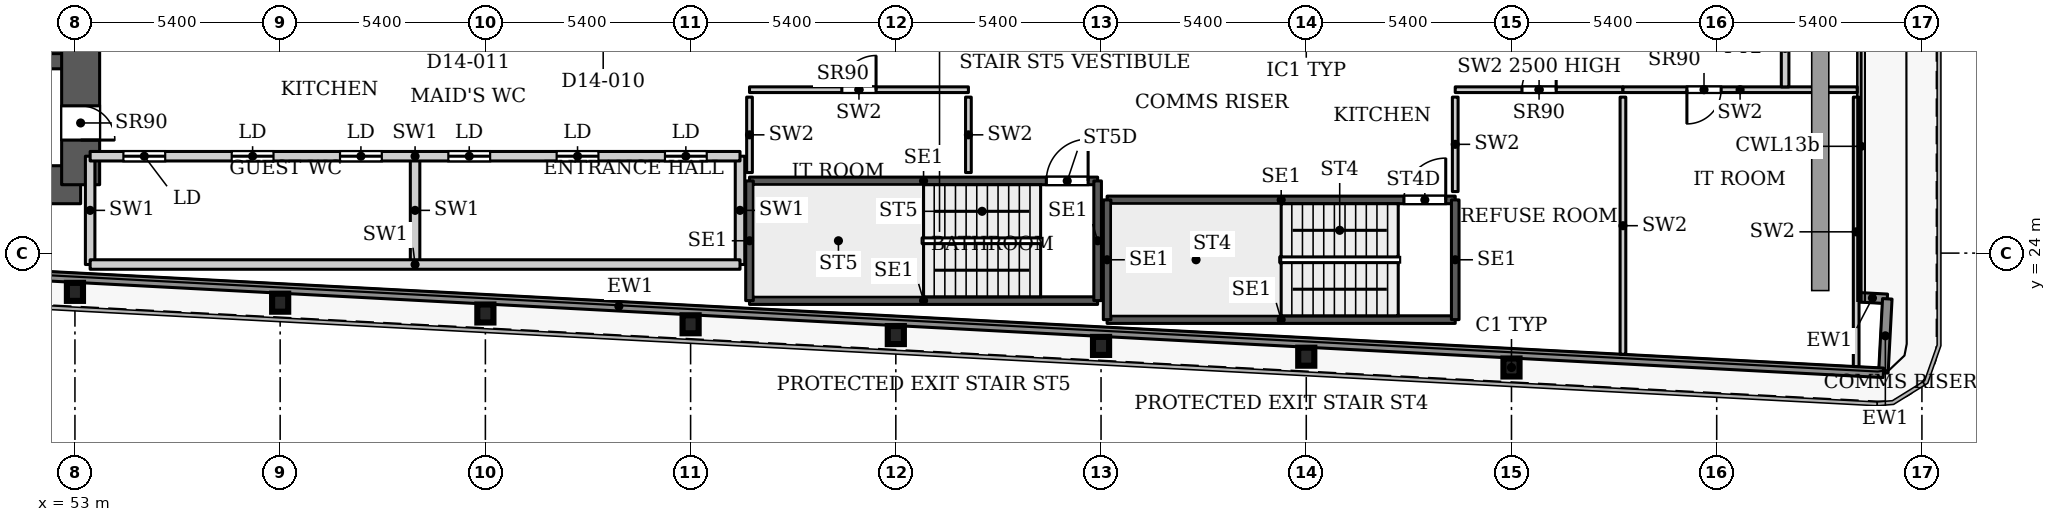
"""IFC4 building model, lengths in metres.
Left out: names, types, materials, properties, quantities, classifications, styles, units other than length and angle.
Written with IfcOpenShell. Run it as: python <this file> out.ifc"""

import sys

from ifc_helpers import new_model, si_unit, direction, frame, frame_2d, origin, origin_2d, place, context, subcontext, project, spatial, rectangle, i_section, extrude, source, transform, mapped, element, fill, save


model = new_model("IFC4")
c1 = context("Model", 3, precision=1e-05, world=origin(), true_north=direction((0.0, 1.0)))
c2 = subcontext(c1, "Body", "Model", "MODEL_VIEW")
j1 = project(units=[si_unit("LENGTHUNIT", "METRE"), si_unit("PLANEANGLEUNIT", "RADIAN")], contexts=[c1])
p1 = place(None, origin())
s1 = spatial("IfcSite", under=j1, at=p1, CompositionType="ELEMENT")
p2 = place(p1, origin())
s2 = spatial("IfcBuilding", under=s1, at=p2, CompositionType="ELEMENT")
p3 = place(p2, frame((0.0, 0.0, 65.6)))
s3 = spatial("IfcBuildingStorey", under=s2, at=p3, CompositionType="ELEMENT", Elevation=65.6)
for number, where, z_axis, x_axis in (
    (1, (90.8, 20.99, 0.0), (0.0, 0.0, 1.0), (1.0, 0.0, 0.0)),
    (2, (85.4, 21.274, 0.0), (0.0, 0.0, 1.0), (1.0, 0.0, 0.0)),
    (3, (80.0, 21.558, 0.0), (0.0, 0.0, 1.0), (1.0, 0.0, 0.0)),
    (4, (74.6, 21.843, 0.0), (0.0, 0.0, 1.0), (1.0, 0.0, 0.0)),
    (5, (69.2, 22.127, 0.0), (0.0, 0.0, 1.0), (1.0, 0.0, 0.0)),
    (6, (63.8, 22.411, 0.0), (0.0, 0.0, 1.0), (1.0, 0.0, 0.0)),
    (7, (58.4, 22.695, 0.0), (0.0, 0.0, 1.0), (1.0, 0.0, 0.0)),
    (8, (53.0, 22.98, 0.0), (0.0, 0.0, 1.0), (1.0, 0.0, 0.0)),
):
    element("IfcColumn", number, at=place(p3, frame(where, z_axis=z_axis, x_axis=x_axis)), inside=s3, PredefinedType="COLUMN", context=c2, shape_type="SweptSolid", body=[
        extrude(i_section(OverallWidth=0.424, OverallDepth=0.474, WebThickness=0.048, FlangeThickness=0.077, FilletRadius=0.014, at=origin_2d()), origin(), (0.0, 0.0, 1.0), 3.9),
    ])
p4 = place(p3, frame((34.75, 25.8, 0.0), z_axis=(0.0, 0.0, 1.0), x_axis=(1.0, 0.0, 0.0)))
e9 = element("IfcWall", 9, at=p4, inside=s3, PredefinedType="SHEAR", context=c2, shape_type="SweptSolid", body=[
    extrude(rectangle(XDim=18.4, YDim=1.0, at=frame_2d((9.2, 0.0))), origin(), (0.0, 0.0, 1.0), 3.9),
])
p5 = place(p3, frame((34.75, 29.05, 0.0), z_axis=(0.0, 0.0, 1.0), x_axis=(1.0, 0.0, 0.0)))
e10 = element("IfcWall", 10, at=p5, inside=s3, PredefinedType="SHEAR", context=c2, shape_type="SweptSolid", body=[
    extrude(rectangle(XDim=18.4, YDim=0.4, at=frame_2d((9.2, 0.0))), origin(), (0.0, 0.0, 1.0), 3.9),
])
p6 = place(p5, frame((15.125, 0.0, 0.0)))
e11 = element("IfcOpeningElement", 11, at=p6, cuts=e10, PredefinedType="OPENING", context=c2, shape_type="SweptSolid", body=[
    extrude(rectangle(XDim=1.1, YDim=2.2, at=frame_2d((0.55, 1.1))), frame((0.0, 0.21, 0.0), z_axis=(0.0, -1.0, 0.0), x_axis=(1.0, 0.0, 0.0)), (0.0, 0.0, 1.0), 0.42),
])
p7 = place(p3, frame((53.15, 25.8, 0.0), z_axis=(0.0, 0.0, 1.0), x_axis=(0.0, 1.0, 0.0)))
e12 = element("IfcWall", 12, at=p7, inside=s3, PredefinedType="SHEAR", context=c2, shape_type="SweptSolid", body=[
    extrude(rectangle(XDim=10.4, YDim=1.0, at=frame_2d((5.2, 0.0))), origin(), (0.0, 0.0, 1.0), 3.9),
])
p8 = place(p7, frame((1.175, 0.0, 0.0)))
e13 = element("IfcOpeningElement", 13, at=p8, cuts=e12, PredefinedType="OPENING", context=c2, shape_type="SweptSolid", body=[
    extrude(rectangle(XDim=0.9, YDim=2.2, at=frame_2d((0.45, 1.1))), frame((0.0, 0.51, 0.0), z_axis=(0.0, -1.0, 0.0), x_axis=(1.0, 0.0, 0.0)), (0.0, 0.0, 1.0), 1.02),
])
p9 = place(p3, frame((99.907, 22.839, 0.0), z_axis=(0.0, 0.0, 1.0), x_axis=(0.998561284263, -0.053622398031, 0.0)))
e14 = element("IfcWall", 14, at=p9, inside=s3, PredefinedType="SOLIDWALL", context=c2, shape_type="SweptSolid", body=[
    extrude(rectangle(XDim=0.783, YDim=0.25, at=frame_2d((0.392, 0.0))), origin(), (0.0, 0.0, 1.0), 3.75),
])
p10 = place(p3, frame((100.689, 22.797, 0.0), z_axis=(0.0, 0.0, 1.0), x_axis=(-0.052841433274, -0.998602915542, 0.0)))
e15 = element("IfcWall", 15, at=p10, inside=s3, PredefinedType="SOLIDWALL", context=c2, shape_type="SweptSolid", body=[
    extrude(rectangle(XDim=1.95, YDim=0.25, at=frame_2d((0.975, 0.0))), origin(), (0.0, 0.0, 1.0), 3.75),
])
p11 = place(p3, frame((100.586, 20.85, 0.0), z_axis=(0.0, 0.0, 1.0), x_axis=(-0.99861746497, 0.052565755559, 0.0)))
e16 = element("IfcWall", 16, at=p11, inside=s3, PredefinedType="SOLIDWALL", context=c2, shape_type="SweptSolid", body=[
    extrude(rectangle(XDim=66.639, YDim=0.25, at=frame_2d((33.319, 0.0))), origin(), (0.0, 0.0, 1.0), 3.75),
])
p12 = place(p3, frame((80.16, 22.25, 0.0), z_axis=(0.0, 0.0, 1.0), x_axis=(1.0, 0.0, 0.0)))
e17 = element("IfcWall", 17, at=p12, inside=s3, PredefinedType="SHEAR", context=c2, shape_type="SweptSolid", body=[
    extrude(rectangle(XDim=9.16, YDim=0.2, at=frame_2d((4.58, 0.0))), origin(), (0.0, 0.0, 1.0), 3.9),
])
p13 = place(p3, frame((80.16, 25.4, 0.0), z_axis=(0.0, 0.0, 1.0), x_axis=(1.0, 0.0, 0.0)))
e18 = element("IfcWall", 18, at=p13, inside=s3, PredefinedType="SHEAR", context=c2, shape_type="SweptSolid", body=[
    extrude(rectangle(XDim=9.16, YDim=0.2, at=frame_2d((4.58, 0.0))), origin(), (0.0, 0.0, 1.0), 3.9),
])
p14 = place(p13, frame((7.81, 0.0, 0.0)))
e19 = element("IfcOpeningElement", 19, at=p14, cuts=e18, PredefinedType="OPENING", context=c2, shape_type="SweptSolid", body=[
    extrude(rectangle(XDim=1.1, YDim=2.2, at=frame_2d((0.55, 1.1))), frame((0.0, 0.11, 0.0), z_axis=(0.0, -1.0, 0.0), x_axis=(1.0, 0.0, 0.0)), (0.0, 0.0, 1.0), 0.22),
])
for number, where, z_axis, x_axis in (
    (20, (80.16, 22.25, 0.0), (0.0, 0.0, 1.0), (0.0, 1.0, 0.0)),
    (21, (89.32, 22.25, 0.0), (0.0, 0.0, 1.0), (0.0, 1.0, 0.0)),
):
    element("IfcWall", number, at=place(p3, frame(where, z_axis=z_axis, x_axis=x_axis)), inside=s3, PredefinedType="SHEAR", context=c2, shape_type="SweptSolid", body=[
        extrude(rectangle(XDim=3.15, YDim=0.2, at=frame_2d((1.575, 0.0))), origin(), (0.0, 0.0, 1.0), 3.9),
    ])
p15 = place(p3, frame((70.75, 22.75, 0.0), z_axis=(0.0, 0.0, 1.0), x_axis=(1.0, 0.0, 0.0)))
e22 = element("IfcWall", 22, at=p15, inside=s3, PredefinedType="SHEAR", context=c2, shape_type="SweptSolid", body=[
    extrude(rectangle(XDim=9.16, YDim=0.2, at=frame_2d((4.58, 0.0))), origin(), (0.0, 0.0, 1.0), 3.9),
])
p16 = place(p3, frame((70.75, 25.9, 0.0), z_axis=(0.0, 0.0, 1.0), x_axis=(1.0, 0.0, 0.0)))
e23 = element("IfcWall", 23, at=p16, inside=s3, PredefinedType="SHEAR", context=c2, shape_type="SweptSolid", body=[
    extrude(rectangle(XDim=9.16, YDim=0.2, at=frame_2d((4.58, 0.0))), origin(), (0.0, 0.0, 1.0), 3.9),
])
p17 = place(p16, frame((7.81, 0.0, 0.0)))
e24 = element("IfcOpeningElement", 24, at=p17, cuts=e23, PredefinedType="OPENING", context=c2, shape_type="SweptSolid", body=[
    extrude(rectangle(XDim=1.1, YDim=2.2, at=frame_2d((0.55, 1.1))), frame((0.0, 0.11, 0.0), z_axis=(0.0, -1.0, 0.0), x_axis=(1.0, 0.0, 0.0)), (0.0, 0.0, 1.0), 0.22),
])
for number, where, z_axis, x_axis in (
    (25, (70.75, 22.75, 0.0), (0.0, 0.0, 1.0), (0.0, 1.0, 0.0)),
    (26, (79.91, 22.75, 0.0), (0.0, 0.0, 1.0), (0.0, 1.0, 0.0)),
):
    element("IfcWall", number, at=place(p3, frame(where, z_axis=z_axis, x_axis=x_axis)), inside=s3, PredefinedType="SHEAR", context=c2, shape_type="SweptSolid", body=[
        extrude(rectangle(XDim=3.15, YDim=0.2, at=frame_2d((1.575, 0.0))), origin(), (0.0, 0.0, 1.0), 3.9),
    ])
for number, where, z_axis, x_axis in (
    (27, (53.4, 23.7, 0.0), (0.0, 0.0, 1.0), (0.0, 1.0, 0.0)),
    (28, (61.95, 23.7, 0.0), (0.0, 0.0, 1.0), (0.0, 1.0, 0.0)),
    (29, (70.5, 23.7, 0.0), (0.0, 0.0, 1.0), (0.0, 1.0, 0.0)),
):
    element("IfcWall", number, at=place(p3, frame(where, z_axis=z_axis, x_axis=x_axis)), inside=s3, PredefinedType="PARTITIONING", context=c2, shape_type="SweptSolid", body=[
        extrude(rectangle(XDim=2.85, YDim=0.25, at=frame_2d((1.425, 0.0))), origin(), (0.0, 0.0, 1.0), 3.9),
    ])
p18 = place(p3, frame((53.4, 23.7, 0.0), z_axis=(0.0, 0.0, 1.0), x_axis=(1.0, 0.0, 0.0)))
e30 = element("IfcWall", 30, at=p18, inside=s3, PredefinedType="PARTITIONING", context=c2, shape_type="SweptSolid", body=[
    extrude(rectangle(XDim=17.1, YDim=0.25, at=frame_2d((8.55, 0.0))), origin(), (0.0, 0.0, 1.0), 3.9),
])
p19 = place(p3, frame((53.4, 26.55, 0.0), z_axis=(0.0, 0.0, 1.0), x_axis=(1.0, 0.0, 0.0)))
e31 = element("IfcWall", 31, at=p19, inside=s3, PredefinedType="PARTITIONING", context=c2, shape_type="SweptSolid", body=[
    extrude(rectangle(XDim=17.1, YDim=0.25, at=frame_2d((8.55, 0.0))), origin(), (0.0, 0.0, 1.0), 3.9),
])
p20 = place(p19, frame((0.875, 0.0, 0.0)))
e32 = element("IfcOpeningElement", 32, at=p20, cuts=e31, PredefinedType="OPENING", context=c2, shape_type="SweptSolid", body=[
    extrude(rectangle(XDim=1.1, YDim=2.2, at=frame_2d((0.55, 1.1))), frame((0.0, 0.135, 0.0), z_axis=(0.0, -1.0, 0.0), x_axis=(1.0, 0.0, 0.0)), (0.0, 0.0, 1.0), 0.27),
])
p21 = place(p19, frame((3.725, 0.0, 0.0)))
e33 = element("IfcOpeningElement", 33, at=p21, cuts=e31, PredefinedType="OPENING", context=c2, shape_type="SweptSolid", body=[
    extrude(rectangle(XDim=1.1, YDim=2.2, at=frame_2d((0.55, 1.1))), frame((0.0, 0.135, 0.0), z_axis=(0.0, -1.0, 0.0), x_axis=(1.0, 0.0, 0.0)), (0.0, 0.0, 1.0), 0.27),
])
p22 = place(p19, frame((6.575, 0.0, 0.0)))
e34 = element("IfcOpeningElement", 34, at=p22, cuts=e31, PredefinedType="OPENING", context=c2, shape_type="SweptSolid", body=[
    extrude(rectangle(XDim=1.1, YDim=2.2, at=frame_2d((0.55, 1.1))), frame((0.0, 0.135, 0.0), z_axis=(0.0, -1.0, 0.0), x_axis=(1.0, 0.0, 0.0)), (0.0, 0.0, 1.0), 0.27),
])
p23 = place(p19, frame((9.425, 0.0, 0.0)))
e35 = element("IfcOpeningElement", 35, at=p23, cuts=e31, PredefinedType="OPENING", context=c2, shape_type="SweptSolid", body=[
    extrude(rectangle(XDim=1.1, YDim=2.2, at=frame_2d((0.55, 1.1))), frame((0.0, 0.135, 0.0), z_axis=(0.0, -1.0, 0.0), x_axis=(1.0, 0.0, 0.0)), (0.0, 0.0, 1.0), 0.27),
])
p24 = place(p19, frame((12.275, 0.0, 0.0)))
e36 = element("IfcOpeningElement", 36, at=p24, cuts=e31, PredefinedType="OPENING", context=c2, shape_type="SweptSolid", body=[
    extrude(rectangle(XDim=1.1, YDim=2.2, at=frame_2d((0.55, 1.1))), frame((0.0, 0.135, 0.0), z_axis=(0.0, -1.0, 0.0), x_axis=(1.0, 0.0, 0.0)), (0.0, 0.0, 1.0), 0.27),
])
p25 = place(p19, frame((15.125, 0.0, 0.0)))
e37 = element("IfcOpeningElement", 37, at=p25, cuts=e31, PredefinedType="OPENING", context=c2, shape_type="SweptSolid", body=[
    extrude(rectangle(XDim=1.1, YDim=2.2, at=frame_2d((0.55, 1.1))), frame((0.0, 0.135, 0.0), z_axis=(0.0, -1.0, 0.0), x_axis=(1.0, 0.0, 0.0)), (0.0, 0.0, 1.0), 0.27),
])
p26 = place(p3, frame((70.75, 28.3, 0.0), z_axis=(0.0, 0.0, 1.0), x_axis=(1.0, 0.0, 0.0)))
e38 = element("IfcWall", 38, at=p26, inside=s3, PredefinedType="PARTITIONING", context=c2, shape_type="SweptSolid", body=[
    extrude(rectangle(XDim=5.76, YDim=0.15, at=frame_2d((2.88, 0.0))), origin(), (0.0, 0.0, 1.0), 3.9),
])
p27 = place(p26, frame((2.43, 0.0, 0.0)))
e39 = element("IfcOpeningElement", 39, at=p27, cuts=e38, PredefinedType="OPENING", context=c2, shape_type="SweptSolid", body=[
    extrude(rectangle(XDim=0.9, YDim=2.2, at=frame_2d((0.45, 1.1))), frame((0.0, 0.085, 0.0), z_axis=(0.0, -1.0, 0.0), x_axis=(1.0, 0.0, 0.0)), (0.0, 0.0, 1.0), 0.17),
])
for number, where, z_axis, x_axis in (
    (40, (70.75, 26.12, 0.0), (0.0, 0.0, 1.0), (0.0, 1.0, 0.0)),
    (41, (76.51, 26.12, 0.0), (0.0, 0.0, 1.0), (0.0, 1.0, 0.0)),
):
    element("IfcWall", number, at=place(p3, frame(where, z_axis=z_axis, x_axis=x_axis)), inside=s3, PredefinedType="PARTITIONING", context=c2, shape_type="SweptSolid", body=[
        extrude(rectangle(XDim=1.985, YDim=0.15, at=frame_2d((0.992, 0.0))), origin(), (0.0, 0.0, 1.0), 3.9),
    ])
p28 = place(p3, frame((89.32, 28.3, 0.0), z_axis=(0.0, 0.0, 1.0), x_axis=(1.0, 0.0, 0.0)))
e42 = element("IfcWall", 42, at=p28, inside=s3, PredefinedType="PARTITIONING", context=c2, shape_type="SweptSolid", body=[
    extrude(rectangle(XDim=4.413, YDim=0.15, at=frame_2d((2.207, 0.0))), origin(), (0.0, 0.0, 1.0), 2.5),
])
p29 = place(p28, frame((1.756, 0.0, 0.0)))
e43 = element("IfcOpeningElement", 43, at=p29, cuts=e42, PredefinedType="OPENING", context=c2, shape_type="SweptSolid", body=[
    extrude(rectangle(XDim=0.9, YDim=2.2, at=frame_2d((0.45, 1.1))), frame((0.0, 0.085, 0.0), z_axis=(0.0, -1.0, 0.0), x_axis=(1.0, 0.0, 0.0)), (0.0, 0.0, 1.0), 0.17),
])
p30 = place(p3, frame((89.32, 25.62, 0.0), z_axis=(0.0, 0.0, 1.0), x_axis=(0.0, 1.0, 0.0)))
e44 = element("IfcWall", 44, at=p30, inside=s3, PredefinedType="PARTITIONING", context=c2, shape_type="SweptSolid", body=[
    extrude(rectangle(XDim=2.485, YDim=0.15, at=frame_2d((1.242, 0.0))), origin(), (0.0, 0.0, 1.0), 3.9),
])
p31 = place(p3, frame((93.733, 21.338, 0.0), z_axis=(0.0, 0.0, 1.0), x_axis=(0.0, 1.0, 0.0)))
e45 = element("IfcWall", 45, at=p31, inside=s3, PredefinedType="PARTITIONING", context=c2, shape_type="SweptSolid", body=[
    extrude(rectangle(XDim=6.767, YDim=0.15, at=frame_2d((3.384, 0.0))), origin(), (0.0, 0.0, 1.0), 3.9),
])
p32 = place(p3, frame((93.733, 28.3, 0.0), z_axis=(0.0, 0.0, 1.0), x_axis=(1.0, 0.0, 0.0)))
e46 = element("IfcWall", 46, at=p32, inside=s3, PredefinedType="PARTITIONING", context=c2, shape_type="SweptSolid", body=[
    extrude(rectangle(XDim=6.165, YDim=0.15, at=frame_2d((3.083, 0.0))), origin(), (0.0, 0.0, 1.0), 3.9),
])
p33 = place(p32, frame((1.683, 0.0, 0.0)))
e47 = element("IfcOpeningElement", 47, at=p33, cuts=e46, PredefinedType="OPENING", context=c2, shape_type="SweptSolid", body=[
    extrude(rectangle(XDim=0.9, YDim=2.2, at=frame_2d((0.45, 1.1))), frame((0.0, 0.085, 0.0), z_axis=(0.0, -1.0, 0.0), x_axis=(1.0, 0.0, 0.0)), (0.0, 0.0, 1.0), 0.17),
])
p34 = place(p3, frame((99.87, 21.015, 0.0), z_axis=(0.0, 0.0, 1.0), x_axis=(0.0, 1.0, 0.0)))
e48 = element("IfcWall", 48, at=p34, inside=s3, PredefinedType="PARTITIONING", context=c2, shape_type="SweptSolid", body=[
    extrude(rectangle(XDim=7.09, YDim=0.15, at=frame_2d((3.545, 0.0))), origin(), (0.0, 0.0, 1.0), 3.9),
])
p35 = place(p3, frame((98.0, 28.374, 0.0), z_axis=(0.0, 0.0, 1.0), x_axis=(0.0, 1.0, 0.0)))
e49 = element("IfcWall", 49, at=p35, inside=s3, PredefinedType="PARTITIONING", context=c2, shape_type="SweptSolid", body=[
    extrude(rectangle(XDim=2.026, YDim=0.2, at=frame_2d((1.013, 0.0))), origin(), (0.0, 0.0, 1.0), 3.6),
])
m1 = source(origin(), c2, "Body", "SweptSolid", [
    extrude(rectangle(XDim=1.1, YDim=2.2, at=frame_2d((0.55, 1.1))), frame((0.0, 0.025, 0.0), z_axis=(0.0, -1.0, 0.0), x_axis=(1.0, 0.0, 0.0)), (0.0, 0.0, 1.0), 0.05),
])
p36 = place(p20, origin())
e50 = element("IfcDoor", 50, at=p36, inside=s3, OperationType="SLIDING_TO_LEFT", PredefinedType="DOOR", context=c2, shape_type="MappedRepresentation", body=[
    mapped(m1, transform((0.0, 0.0, 0.0), x_axis=(1.0, 0.0, 0.0), y_axis=(0.0, 1.0, 0.0), z_axis=(0.0, 0.0, 1.0), scale=1.0)),
])
fill(e32, e50)
p37 = place(p21, origin())
e51 = element("IfcDoor", 51, at=p37, inside=s3, OperationType="SLIDING_TO_LEFT", PredefinedType="DOOR", context=c2, shape_type="MappedRepresentation", body=[
    mapped(m1, transform((0.0, 0.0, 0.0), x_axis=(1.0, 0.0, 0.0), y_axis=(0.0, 1.0, 0.0), z_axis=(0.0, 0.0, 1.0), scale=1.0)),
])
fill(e33, e51)
p38 = place(p22, origin())
e52 = element("IfcDoor", 52, at=p38, inside=s3, OperationType="SLIDING_TO_LEFT", PredefinedType="DOOR", context=c2, shape_type="MappedRepresentation", body=[
    mapped(m1, transform((0.0, 0.0, 0.0), x_axis=(1.0, 0.0, 0.0), y_axis=(0.0, 1.0, 0.0), z_axis=(0.0, 0.0, 1.0), scale=1.0)),
])
fill(e34, e52)
p39 = place(p23, origin())
e53 = element("IfcDoor", 53, at=p39, inside=s3, OperationType="SLIDING_TO_LEFT", PredefinedType="DOOR", context=c2, shape_type="MappedRepresentation", body=[
    mapped(m1, transform((0.0, 0.0, 0.0), x_axis=(1.0, 0.0, 0.0), y_axis=(0.0, 1.0, 0.0), z_axis=(0.0, 0.0, 1.0), scale=1.0)),
])
fill(e35, e53)
p40 = place(p24, origin())
e54 = element("IfcDoor", 54, at=p40, inside=s3, OperationType="SLIDING_TO_LEFT", PredefinedType="DOOR", context=c2, shape_type="MappedRepresentation", body=[
    mapped(m1, transform((0.0, 0.0, 0.0), x_axis=(1.0, 0.0, 0.0), y_axis=(0.0, 1.0, 0.0), z_axis=(0.0, 0.0, 1.0), scale=1.0)),
])
fill(e36, e54)
p41 = place(p25, origin())
e55 = element("IfcDoor", 55, at=p41, inside=s3, OperationType="SLIDING_TO_LEFT", PredefinedType="DOOR", context=c2, shape_type="MappedRepresentation", body=[
    mapped(m1, transform((0.0, 0.0, 0.0), x_axis=(1.0, 0.0, 0.0), y_axis=(0.0, 1.0, 0.0), z_axis=(0.0, 0.0, 1.0), scale=1.0)),
])
fill(e37, e55)
m2 = source(origin(), c2, "Body", "SweptSolid", [
    extrude(rectangle(XDim=0.9, YDim=2.2, at=frame_2d((0.45, 1.1))), frame((0.0, 0.025, 0.0), z_axis=(0.0, -1.0, 0.0), x_axis=(1.0, 0.0, 0.0)), (0.0, 0.0, 1.0), 0.05),
])
p42 = place(p8, origin())
e56 = element("IfcDoor", 56, at=p42, inside=s3, OperationType="SINGLE_SWING_RIGHT", PredefinedType="DOOR", context=c2, shape_type="MappedRepresentation", body=[
    mapped(m2, transform((0.0, 0.0, 0.0), x_axis=(1.0, 0.0, 0.0), y_axis=(0.0, 1.0, 0.0), z_axis=(0.0, 0.0, 1.0), scale=1.0)),
])
fill(e13, e56)
p43 = place(p27, origin())
e57 = element("IfcDoor", 57, at=p43, inside=s3, OperationType="SINGLE_SWING_LEFT", PredefinedType="DOOR", context=c2, shape_type="MappedRepresentation", body=[
    mapped(m2, transform((0.0, 0.0, 0.0), x_axis=(1.0, 0.0, 0.0), y_axis=(0.0, 1.0, 0.0), z_axis=(0.0, 0.0, 1.0), scale=1.0)),
])
fill(e39, e57)
p44 = place(p29, origin())
e58 = element("IfcDoor", 58, at=p44, inside=s3, OperationType="SINGLE_SWING_LEFT", PredefinedType="DOOR", context=c2, shape_type="MappedRepresentation", body=[
    mapped(m2, transform((0.0, 0.0, 0.0), x_axis=(1.0, 0.0, 0.0), y_axis=(0.0, 1.0, 0.0), z_axis=(0.0, 0.0, 1.0), scale=1.0)),
])
fill(e43, e58)
p45 = place(p33, origin())
e59 = element("IfcDoor", 59, at=p45, inside=s3, OperationType="SINGLE_SWING_RIGHT", PredefinedType="DOOR", context=c2, shape_type="MappedRepresentation", body=[
    mapped(m2, transform((0.0, 0.0, 0.0), x_axis=(1.0, 0.0, 0.0), y_axis=(0.0, 1.0, 0.0), z_axis=(0.0, 0.0, 1.0), scale=1.0)),
])
fill(e47, e59)
m3 = source(origin(), c2, "Body", "SweptSolid", [
    extrude(rectangle(XDim=1.1, YDim=2.2, at=frame_2d((0.55, 1.1))), frame((0.0, 0.025, 0.0), z_axis=(0.0, -1.0, 0.0), x_axis=(1.0, 0.0, 0.0)), (0.0, 0.0, 1.0), 0.05),
])
p46 = place(p14, origin())
e60 = element("IfcDoor", 60, at=p46, inside=s3, OperationType="SINGLE_SWING_LEFT", PredefinedType="DOOR", context=c2, shape_type="MappedRepresentation", body=[
    mapped(m3, transform((0.0, 0.0, 0.0), x_axis=(1.0, 0.0, 0.0), y_axis=(0.0, 1.0, 0.0), z_axis=(0.0, 0.0, 1.0), scale=1.0)),
])
fill(e19, e60)
p47 = place(p17, origin())
e61 = element("IfcDoor", 61, at=p47, inside=s3, OperationType="SINGLE_SWING_LEFT", PredefinedType="DOOR", context=c2, shape_type="MappedRepresentation", body=[
    mapped(m3, transform((0.0, 0.0, 0.0), x_axis=(1.0, 0.0, 0.0), y_axis=(0.0, 1.0, 0.0), z_axis=(0.0, 0.0, 1.0), scale=1.0)),
])
fill(e24, e61)
save(model, sys.argv[1])
